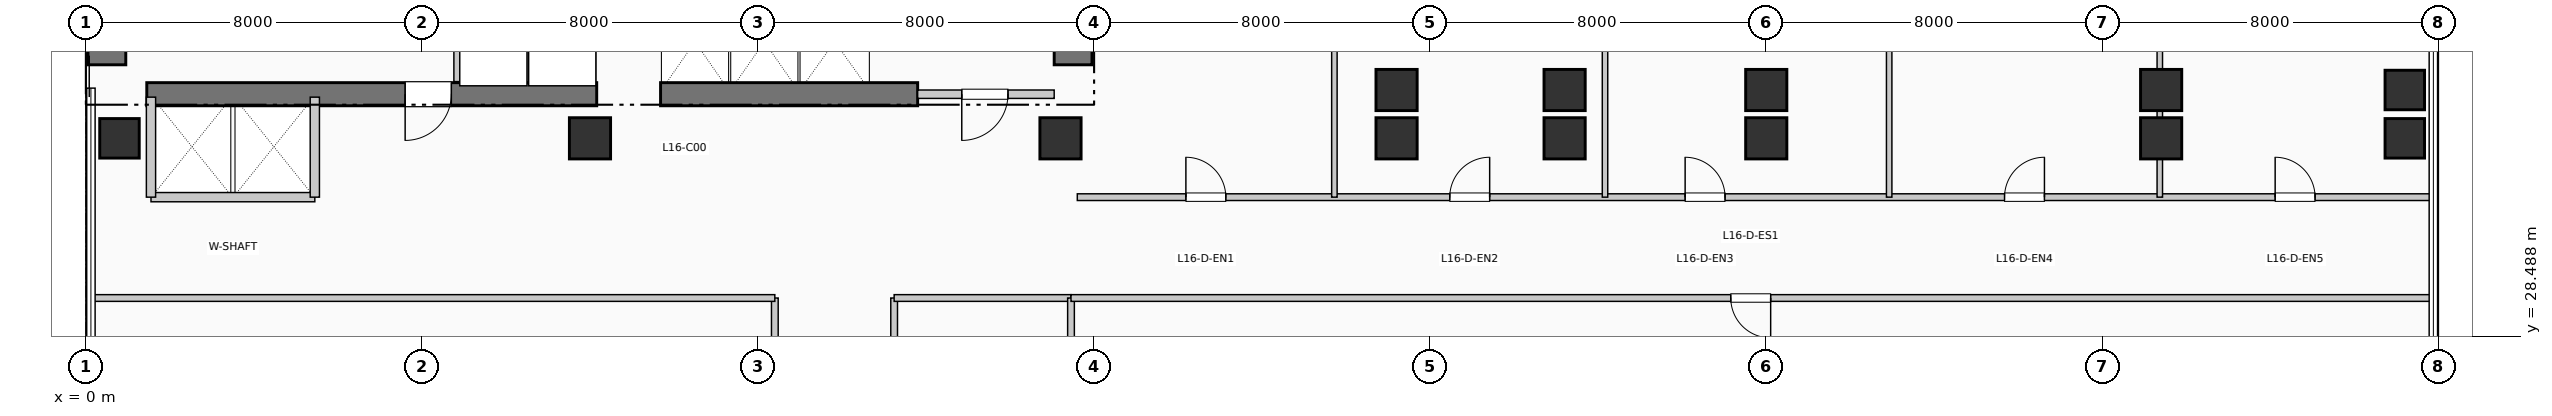
"""IFC4 building model, lengths in metres.
Left out: names, types, materials, properties, quantities, classifications, styles, units other than length and angle.
Written with IfcOpenShell. Run it as: python <this file> out.ifc"""

import sys

from ifc_helpers import new_model, si_unit, direction, frame, frame_2d, origin, origin_2d, place, context, subcontext, project, spatial, rectangle, extrude, element, fill, save


model = new_model("IFC4")
c1 = context("Model", 3, precision=1e-05, world=origin(), true_north=direction((0.0, 1.0)))
c2 = subcontext(c1, "Body", "Model", "MODEL_VIEW")
j1 = project(units=[si_unit("LENGTHUNIT", "METRE"), si_unit("PLANEANGLEUNIT", "RADIAN")], contexts=[c1])
p1 = place(None, origin())
s1 = spatial("IfcSite", under=j1, at=p1, CompositionType="ELEMENT")
p2 = place(p1, origin())
s2 = spatial("IfcBuilding", under=s1, at=p2, CompositionType="ELEMENT")
p3 = place(p2, frame((0.0, 0.0, 69.96)))
s3 = spatial("IfcBuildingStorey", under=s2, at=p3, CompositionType="ELEMENT", Elevation=69.96)
p4 = place(p3, frame((0.5, 34.95, 0.0), z_axis=(0.0, 0.0, 1.0), x_axis=(0.0, 1.0, 0.0)))
e1 = element("IfcWall", 1, at=p4, inside=s3, PredefinedType="SHEAR", context=c2, shape_type="SweptSolid", body=[
    extrude(rectangle(XDim=7.9, YDim=0.9, at=frame_2d((3.95, 0.0))), origin(), (0.0, 0.0, 1.0), 3.96),
])
p5 = place(p3, frame((23.5, 34.95, 0.0), z_axis=(0.0, 0.0, 1.0), x_axis=(0.0, 1.0, 0.0)))
e2 = element("IfcWall", 2, at=p5, inside=s3, PredefinedType="SHEAR", context=c2, shape_type="SweptSolid", body=[
    extrude(rectangle(XDim=10.64, YDim=0.9, at=frame_2d((5.32, 0.0))), origin(), (0.0, 0.0, 1.0), 3.96),
])
p6 = place(p3, frame((1.45, 34.25, 0.0), z_axis=(0.0, 0.0, 1.0), x_axis=(1.0, 0.0, 0.0)))
e3 = element("IfcWall", 3, at=p6, inside=s3, PredefinedType="SHEAR", context=c2, shape_type="SweptSolid", body=[
    extrude(rectangle(XDim=10.71, YDim=0.55, at=frame_2d((5.355, 0.0))), origin(), (0.0, 0.0, 1.0), 3.96),
])
p7 = place(p6, frame((7.25, 0.0, 0.0), z_axis=(0.0, 0.0, 1.0), x_axis=(-1.0, 0.0, 0.0)))
e4 = element("IfcOpeningElement", 4, at=p7, cuts=e3, PredefinedType="OPENING", context=c2, shape_type="SweptSolid", body=[
    extrude(rectangle(XDim=1.1, YDim=2.15, at=frame_2d((0.55, 1.075))), frame((0.0, 0.285, 0.0), z_axis=(0.0, -1.0, 0.0), x_axis=(1.0, 0.0, 0.0)), (0.0, 0.0, 1.0), 0.57),
])
p8 = place(p3, frame((13.68, 34.25, 0.0), z_axis=(0.0, 0.0, 1.0), x_axis=(1.0, 0.0, 0.0)))
e5 = element("IfcWall", 5, at=p8, inside=s3, PredefinedType="SHEAR", context=c2, shape_type="SweptSolid", body=[
    extrude(rectangle(XDim=6.12, YDim=0.55, at=frame_2d((3.06, 0.0))), origin(), (0.0, 0.0, 1.0), 3.96),
])
p9 = place(p3, frame((0.8, 33.2, 0.0), z_axis=(0.0, 0.0, 1.0), x_axis=(1.0, 0.0, 0.0)))
e6 = element("IfcColumn", 6, at=p9, inside=s3, PredefinedType="COLUMN", context=c2, shape_type="SweptSolid", body=[
    extrude(rectangle(XDim=0.94, YDim=0.94, at=origin_2d()), origin(), (0.0, 0.0, 1.0), 3.96),
])
for number, where, z_axis, x_axis in (
    (7, (12.0, 33.2, 0.0), (0.0, 0.0, 1.0), (1.0, 0.0, 0.0)),
    (8, (23.2, 33.2, 0.0), (0.0, 0.0, 1.0), (1.0, 0.0, 0.0)),
    (9, (31.2, 33.2, 0.0), (0.0, 0.0, 1.0), (1.0, 0.0, 0.0)),
    (10, (31.2, 34.35, 0.0), (0.0, 0.0, 1.0), (1.0, 0.0, 0.0)),
    (11, (35.2, 33.2, 0.0), (0.0, 0.0, 1.0), (1.0, 0.0, 0.0)),
    (12, (35.2, 34.35, 0.0), (0.0, 0.0, 1.0), (1.0, 0.0, 0.0)),
    (13, (40.0, 33.2, 0.0), (0.0, 0.0, 1.0), (1.0, 0.0, 0.0)),
    (14, (40.0, 34.35, 0.0), (0.0, 0.0, 1.0), (1.0, 0.0, 0.0)),
    (15, (49.4, 33.2, 0.0), (0.0, 0.0, 1.0), (1.0, 0.0, 0.0)),
    (16, (49.4, 34.35, 0.0), (0.0, 0.0, 1.0), (1.0, 0.0, 0.0)),
):
    element("IfcColumn", number, at=place(p3, frame(where, z_axis=z_axis, x_axis=x_axis)), inside=s3, PredefinedType="COLUMN", context=c2, shape_type="SweptSolid", body=[
        extrude(rectangle(XDim=0.98, YDim=0.98, at=origin_2d()), origin(), (0.0, 0.0, 1.0), 3.96),
    ])
for number, where, z_axis, x_axis in (
    (17, (55.2, 33.2, 0.0), (0.0, 0.0, 1.0), (1.0, 0.0, 0.0)),
    (18, (55.2, 34.35, 0.0), (0.0, 0.0, 1.0), (1.0, 0.0, 0.0)),
):
    element("IfcColumn", number, at=place(p3, frame(where, z_axis=z_axis, x_axis=x_axis)), inside=s3, PredefinedType="COLUMN", context=c2, shape_type="SweptSolid", body=[
        extrude(rectangle(XDim=0.94, YDim=0.94, at=origin_2d()), origin(), (0.0, 0.0, 1.0), 3.96),
    ])
p10 = place(p3, frame((8.86, 34.55, 0.0), z_axis=(0.0, 0.0, 1.0), x_axis=(0.0, 1.0, 0.0)))
e19 = element("IfcWall", 19, at=p10, inside=s3, PredefinedType="PARTITIONING", context=c2, shape_type="SweptSolid", body=[
    extrude(rectangle(XDim=2.5, YDim=0.2, at=frame_2d((1.25, 0.0))), origin(), (0.0, 0.0, 1.0), 3.71),
])
p11 = place(p3, frame((19.8, 34.25, 0.0), z_axis=(0.0, 0.0, 1.0), x_axis=(1.0, 0.0, 0.0)))
e20 = element("IfcWall", 20, at=p11, inside=s3, PredefinedType="PARTITIONING", context=c2, shape_type="SweptSolid", body=[
    extrude(rectangle(XDim=3.25, YDim=0.2, at=frame_2d((1.625, 0.0))), origin(), (0.0, 0.0, 1.0), 3.71),
])
p12 = place(p11, frame((2.15, 0.0, 0.0), z_axis=(0.0, 0.0, 1.0), x_axis=(-1.0, 0.0, 0.0)))
e21 = element("IfcOpeningElement", 21, at=p12, cuts=e20, PredefinedType="OPENING", context=c2, shape_type="SweptSolid", body=[
    extrude(rectangle(XDim=1.1, YDim=2.15, at=frame_2d((0.55, 1.075))), frame((0.0, 0.11, 0.0), z_axis=(0.0, -1.0, 0.0), x_axis=(1.0, 0.0, 0.0)), (0.0, 0.0, 1.0), 0.22),
])
p13 = place(p3, frame((1.55, 31.8, 0.0), z_axis=(0.0, 0.0, 1.0), x_axis=(1.0, 0.0, 0.0)))
e22 = element("IfcWall", 22, at=p13, inside=s3, PredefinedType="PARTITIONING", context=c2, shape_type="SweptSolid", body=[
    extrude(rectangle(XDim=3.9, YDim=0.22, at=frame_2d((1.95, 0.0))), origin(), (0.0, 0.0, 1.0), 3.71),
])
for number, where, z_axis, x_axis in (
    (23, (1.55, 31.8, 0.0), (0.0, 0.0, 1.0), (0.0, 1.0, 0.0)),
    (24, (5.45, 31.8, 0.0), (0.0, 0.0, 1.0), (0.0, 1.0, 0.0)),
):
    element("IfcWall", number, at=place(p3, frame(where, z_axis=z_axis, x_axis=x_axis)), inside=s3, PredefinedType="PARTITIONING", context=c2, shape_type="SweptSolid", body=[
        extrude(rectangle(XDim=2.38, YDim=0.22, at=frame_2d((1.19, 0.0))), origin(), (0.0, 0.0, 1.0), 3.71),
    ])
p14 = place(p3, frame((16.4, 8.8, 0.0), z_axis=(0.0, 0.0, 1.0), x_axis=(0.0, 1.0, 0.0)))
e25 = element("IfcWall", 25, at=p14, inside=s3, PredefinedType="PARTITIONING", context=c2, shape_type="SweptSolid", body=[
    extrude(rectangle(XDim=20.6, YDim=0.16, at=frame_2d((10.3, 0.0))), origin(), (0.0, 0.0, 1.0), 3.71),
])
p15 = place(p14, frame((10.775, 0.0, 0.0), z_axis=(0.0, 0.0, 1.0), x_axis=(-1.0, 0.0, 0.0)))
e26 = element("IfcOpeningElement", 26, at=p15, cuts=e25, PredefinedType="OPENING", context=c2, shape_type="SweptSolid", body=[
    extrude(rectangle(XDim=0.95, YDim=2.15, at=frame_2d((0.475, 1.075))), frame((0.0, 0.09, 0.0), z_axis=(0.0, -1.0, 0.0), x_axis=(1.0, 0.0, 0.0)), (0.0, 0.0, 1.0), 0.18),
])
p16 = place(p3, frame((19.24, 8.8, 0.0), z_axis=(0.0, 0.0, 1.0), x_axis=(0.0, 1.0, 0.0)))
e27 = element("IfcWall", 27, at=p16, inside=s3, PredefinedType="PARTITIONING", context=c2, shape_type="SweptSolid", body=[
    extrude(rectangle(XDim=20.6, YDim=0.16, at=frame_2d((10.3, 0.0))), origin(), (0.0, 0.0, 1.0), 3.71),
])
p17 = place(p16, frame((4.675, 0.0, 0.0)))
e28 = element("IfcOpeningElement", 28, at=p17, cuts=e27, PredefinedType="OPENING", context=c2, shape_type="SweptSolid", body=[
    extrude(rectangle(XDim=0.95, YDim=2.15, at=frame_2d((0.475, 1.075))), frame((0.0, 0.09, 0.0), z_axis=(0.0, -1.0, 0.0), x_axis=(1.0, 0.0, 0.0)), (0.0, 0.0, 1.0), 0.18),
])
p18 = place(p16, frame((14.975, 0.0, 0.0)))
e29 = element("IfcOpeningElement", 29, at=p18, cuts=e27, PredefinedType="OPENING", context=c2, shape_type="SweptSolid", body=[
    extrude(rectangle(XDim=0.95, YDim=2.15, at=frame_2d((0.475, 1.075))), frame((0.0, 0.09, 0.0), z_axis=(0.0, -1.0, 0.0), x_axis=(1.0, 0.0, 0.0)), (0.0, 0.0, 1.0), 0.18),
])
p19 = place(p3, frame((0.19, 29.4, 0.0), z_axis=(0.0, 0.0, 1.0), x_axis=(1.0, 0.0, 0.0)))
e30 = element("IfcWall", 30, at=p19, inside=s3, PredefinedType="PARTITIONING", context=c2, shape_type="SweptSolid", body=[
    extrude(rectangle(XDim=16.21, YDim=0.16, at=frame_2d((8.105, 0.0))), origin(), (0.0, 0.0, 1.0), 3.365),
])
p20 = place(p3, frame((19.24, 29.4, 0.0), z_axis=(0.0, 0.0, 1.0), x_axis=(1.0, 0.0, 0.0)))
e31 = element("IfcWall", 31, at=p20, inside=s3, PredefinedType="PARTITIONING", context=c2, shape_type="SweptSolid", body=[
    extrude(rectangle(XDim=4.21, YDim=0.16, at=frame_2d((2.105, 0.0))), origin(), (0.0, 0.0, 1.0), 3.71),
])
p21 = place(p3, frame((23.45, 0.19, 0.0), z_axis=(0.0, 0.0, 1.0), x_axis=(0.0, 1.0, 0.0)))
e32 = element("IfcWall", 32, at=p21, inside=s3, PredefinedType="PARTITIONING", context=c2, shape_type="SweptSolid", body=[
    extrude(rectangle(XDim=29.21, YDim=0.16, at=frame_2d((14.605, 0.0))), origin(), (0.0, 0.0, 1.0), 2.995),
])
p22 = place(p3, frame((23.45, 29.4, 0.0), z_axis=(0.0, 0.0, 1.0), x_axis=(1.0, 0.0, 0.0)))
e33 = element("IfcWall", 33, at=p22, inside=s3, PredefinedType="PARTITIONING", context=c2, shape_type="SweptSolid", body=[
    extrude(rectangle(XDim=32.36, YDim=0.16, at=frame_2d((16.18, 0.0))), origin(), (0.0, 0.0, 1.0), 3.365),
])
p23 = place(p22, frame((16.655, 0.0, 0.0), z_axis=(0.0, 0.0, 1.0), x_axis=(-1.0, 0.0, 0.0)))
e34 = element("IfcOpeningElement", 34, at=p23, cuts=e33, PredefinedType="OPENING", context=c2, shape_type="SweptSolid", body=[
    extrude(rectangle(XDim=0.95, YDim=2.15, at=frame_2d((0.475, 1.075))), frame((0.0, 0.09, 0.0), z_axis=(0.0, -1.0, 0.0), x_axis=(1.0, 0.0, 0.0)), (0.0, 0.0, 1.0), 0.18),
])
p24 = place(p3, frame((23.6, 31.8, 0.0), z_axis=(0.0, 0.0, 1.0), x_axis=(1.0, 0.0, 0.0)))
e35 = element("IfcWall", 35, at=p24, inside=s3, PredefinedType="PARTITIONING", context=c2, shape_type="SweptSolid", body=[
    extrude(rectangle(XDim=32.21, YDim=0.16, at=frame_2d((16.105, 0.0))), origin(), (0.0, 0.0, 1.0), 3.71),
])
p25 = place(p24, frame((2.585, 0.0, 0.0)))
e36 = element("IfcOpeningElement", 36, at=p25, cuts=e35, PredefinedType="OPENING", context=c2, shape_type="SweptSolid", body=[
    extrude(rectangle(XDim=0.95, YDim=2.15, at=frame_2d((0.475, 1.075))), frame((0.0, 0.09, 0.0), z_axis=(0.0, -1.0, 0.0), x_axis=(1.0, 0.0, 0.0)), (0.0, 0.0, 1.0), 0.18),
])
p26 = place(p24, frame((8.866, 0.0, 0.0)))
e37 = element("IfcOpeningElement", 37, at=p26, cuts=e35, PredefinedType="OPENING", context=c2, shape_type="SweptSolid", body=[
    extrude(rectangle(XDim=0.95, YDim=2.15, at=frame_2d((0.475, 1.075))), frame((0.0, 0.09, 0.0), z_axis=(0.0, -1.0, 0.0), x_axis=(1.0, 0.0, 0.0)), (0.0, 0.0, 1.0), 0.18),
])
p27 = place(p24, frame((14.469, 0.0, 0.0)))
e38 = element("IfcOpeningElement", 38, at=p27, cuts=e35, PredefinedType="OPENING", context=c2, shape_type="SweptSolid", body=[
    extrude(rectangle(XDim=0.95, YDim=2.15, at=frame_2d((0.475, 1.075))), frame((0.0, 0.09, 0.0), z_axis=(0.0, -1.0, 0.0), x_axis=(1.0, 0.0, 0.0)), (0.0, 0.0, 1.0), 0.18),
])
p28 = place(p24, frame((22.072, 0.0, 0.0)))
e39 = element("IfcOpeningElement", 39, at=p28, cuts=e35, PredefinedType="OPENING", context=c2, shape_type="SweptSolid", body=[
    extrude(rectangle(XDim=0.95, YDim=2.15, at=frame_2d((0.475, 1.075))), frame((0.0, 0.09, 0.0), z_axis=(0.0, -1.0, 0.0), x_axis=(1.0, 0.0, 0.0)), (0.0, 0.0, 1.0), 0.18),
])
p29 = place(p24, frame((28.514, 0.0, 0.0)))
e40 = element("IfcOpeningElement", 40, at=p29, cuts=e35, PredefinedType="OPENING", context=c2, shape_type="SweptSolid", body=[
    extrude(rectangle(XDim=0.95, YDim=2.15, at=frame_2d((0.475, 1.075))), frame((0.0, 0.09, 0.0), z_axis=(0.0, -1.0, 0.0), x_axis=(1.0, 0.0, 0.0)), (0.0, 0.0, 1.0), 0.18),
])
for number, where, z_axis, x_axis in (
    (41, (29.72, 31.8, 0.0), (0.0, 0.0, 1.0), (0.0, 1.0, 0.0)),
    (42, (36.162, 31.8, 0.0), (0.0, 0.0, 1.0), (0.0, 1.0, 0.0)),
    (43, (42.926, 31.8, 0.0), (0.0, 0.0, 1.0), (0.0, 1.0, 0.0)),
):
    element("IfcWall", number, at=place(p3, frame(where, z_axis=z_axis, x_axis=x_axis)), inside=s3, PredefinedType="PARTITIONING", context=c2, shape_type="SweptSolid", body=[
        extrude(rectangle(XDim=14.01, YDim=0.13, at=frame_2d((7.005, 0.0))), origin(), (0.0, 0.0, 1.0), 3.71),
    ])
p30 = place(p3, frame((49.368, 31.8, 0.0), z_axis=(0.0, 0.0, 1.0), x_axis=(0.0, 1.0, 0.0)))
e44 = element("IfcWall", 44, at=p30, inside=s3, PredefinedType="PARTITIONING", context=c2, shape_type="SweptSolid", body=[
    extrude(rectangle(XDim=14.01, YDim=0.13, at=frame_2d((7.005, 0.0))), origin(), (0.0, 0.0, 1.0), 2.995),
])
p31 = place(p7, origin())
e45 = element("IfcDoor", 45, at=p31, inside=s3, OperationType="SINGLE_SWING_LEFT", PredefinedType="DOOR", context=c2, shape_type="SweptSolid", body=[
    extrude(rectangle(XDim=1.1, YDim=2.15, at=frame_2d((0.55, 1.075))), frame((0.0, 0.025, 0.0), z_axis=(0.0, -1.0, 0.0), x_axis=(1.0, 0.0, 0.0)), (0.0, 0.0, 1.0), 0.05),
])
fill(e4, e45)
p32 = place(p12, origin())
e46 = element("IfcDoor", 46, at=p32, inside=s3, OperationType="SINGLE_SWING_LEFT", PredefinedType="DOOR", context=c2, shape_type="SweptSolid", body=[
    extrude(rectangle(XDim=1.1, YDim=2.15, at=frame_2d((0.55, 1.075))), frame((0.0, 0.025, 0.0), z_axis=(0.0, -1.0, 0.0), x_axis=(1.0, 0.0, 0.0)), (0.0, 0.0, 1.0), 0.05),
])
fill(e21, e46)
p33 = place(p23, origin())
e47 = element("IfcDoor", 47, at=p33, inside=s3, OperationType="SINGLE_SWING_RIGHT", PredefinedType="DOOR", context=c2, shape_type="SweptSolid", body=[
    extrude(rectangle(XDim=0.95, YDim=2.15, at=frame_2d((0.475, 1.075))), frame((0.0, 0.025, 0.0), z_axis=(0.0, -1.0, 0.0), x_axis=(1.0, 0.0, 0.0)), (0.0, 0.0, 1.0), 0.05),
])
fill(e34, e47)
p34 = place(p25, origin())
e48 = element("IfcDoor", 48, at=p34, inside=s3, OperationType="SINGLE_SWING_LEFT", PredefinedType="DOOR", context=c2, shape_type="SweptSolid", body=[
    extrude(rectangle(XDim=0.95, YDim=2.15, at=frame_2d((0.475, 1.075))), frame((0.0, 0.025, 0.0), z_axis=(0.0, -1.0, 0.0), x_axis=(1.0, 0.0, 0.0)), (0.0, 0.0, 1.0), 0.05),
])
fill(e36, e48)
p35 = place(p26, origin())
e49 = element("IfcDoor", 49, at=p35, inside=s3, OperationType="SINGLE_SWING_RIGHT", PredefinedType="DOOR", context=c2, shape_type="SweptSolid", body=[
    extrude(rectangle(XDim=0.95, YDim=2.15, at=frame_2d((0.475, 1.075))), frame((0.0, 0.025, 0.0), z_axis=(0.0, -1.0, 0.0), x_axis=(1.0, 0.0, 0.0)), (0.0, 0.0, 1.0), 0.05),
])
fill(e37, e49)
p36 = place(p27, origin())
e50 = element("IfcDoor", 50, at=p36, inside=s3, OperationType="SINGLE_SWING_LEFT", PredefinedType="DOOR", context=c2, shape_type="SweptSolid", body=[
    extrude(rectangle(XDim=0.95, YDim=2.15, at=frame_2d((0.475, 1.075))), frame((0.0, 0.025, 0.0), z_axis=(0.0, -1.0, 0.0), x_axis=(1.0, 0.0, 0.0)), (0.0, 0.0, 1.0), 0.05),
])
fill(e38, e50)
p37 = place(p28, origin())
e51 = element("IfcDoor", 51, at=p37, inside=s3, OperationType="SINGLE_SWING_RIGHT", PredefinedType="DOOR", context=c2, shape_type="SweptSolid", body=[
    extrude(rectangle(XDim=0.95, YDim=2.15, at=frame_2d((0.475, 1.075))), frame((0.0, 0.025, 0.0), z_axis=(0.0, -1.0, 0.0), x_axis=(1.0, 0.0, 0.0)), (0.0, 0.0, 1.0), 0.05),
])
fill(e39, e51)
p38 = place(p29, origin())
e52 = element("IfcDoor", 52, at=p38, inside=s3, OperationType="SINGLE_SWING_LEFT", PredefinedType="DOOR", context=c2, shape_type="SweptSolid", body=[
    extrude(rectangle(XDim=0.95, YDim=2.15, at=frame_2d((0.475, 1.075))), frame((0.0, 0.025, 0.0), z_axis=(0.0, -1.0, 0.0), x_axis=(1.0, 0.0, 0.0)), (0.0, 0.0, 1.0), 0.05),
])
fill(e40, e52)
save(model, sys.argv[1])
